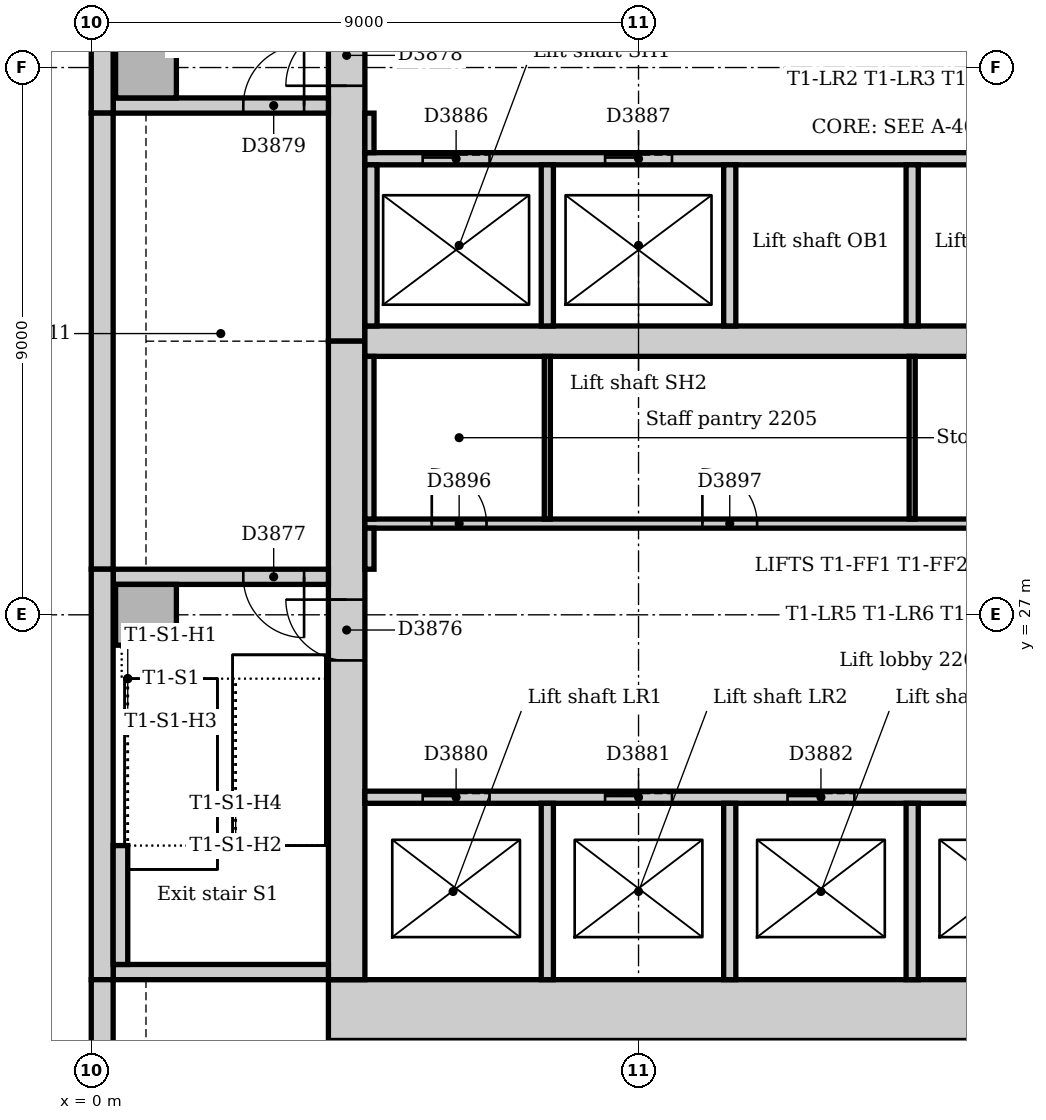
"""IFC4 building model, lengths in metres.
Left out: names, types, materials, properties, quantities, classifications, styles, units other than length and angle.
Written with IfcOpenShell. Run it as: python <this file> out.ifc"""

import sys

from ifc_helpers import new_model, si_unit, direction, frame, frame_2d, origin, origin_2d, place, context, subcontext, project, spatial, rectangle, extrude, element, fill, save


model = new_model("IFC4")
c1 = context("Model", 3, precision=1e-05, world=origin(), true_north=direction((0.0, 1.0)))
c2 = subcontext(c1, "Body", "Model", "MODEL_VIEW")
j1 = project(units=[si_unit("LENGTHUNIT", "METRE"), si_unit("PLANEANGLEUNIT", "RADIAN")], contexts=[c1])
p1 = place(None, origin())
s1 = spatial("IfcSite", under=j1, at=p1, CompositionType="ELEMENT")
p2 = place(p1, origin())
s2 = spatial("IfcBuilding", under=s1, at=p2, CompositionType="ELEMENT")
p3 = place(p2, frame((0.0, 0.0, 95.0)))
s3 = spatial("IfcBuildingStorey", under=s2, at=p3, CompositionType="ELEMENT", Elevation=95.0)
p4 = place(p3, frame((3.9, 20.5, 0.0), z_axis=(0.0, 0.0, 1.0), x_axis=(1.0, 0.0, 0.0)))
e1 = element("IfcWall", 1, at=p4, inside=s3, PredefinedType="SOLIDWALL", context=c2, shape_type="SweptSolid", body=[
    extrude(rectangle(XDim=19.6, YDim=1.0, at=frame_2d((9.8, 0.0))), origin(), (0.0, 0.0, 1.0), 5.0),
])
p5 = place(p3, frame((4.2, 42.0, 0.0), z_axis=(0.0, 0.0, 1.0), x_axis=(0.0, -1.0, 0.0)))
e2 = element("IfcWall", 2, at=p5, inside=s3, PredefinedType="SOLIDWALL", context=c2, shape_type="SweptSolid", body=[
    extrude(rectangle(XDim=10.5, YDim=0.6, at=frame_2d((5.25, 0.0))), origin(), (0.0, 0.0, 1.0), 5.0),
])
p6 = place(p5, frame((5.3, 0.0, 0.0)))
e3 = element("IfcOpeningElement", 3, at=p6, cuts=e2, PredefinedType="OPENING", context=c2, shape_type="SweptSolid", body=[
    extrude(rectangle(XDim=1.0, YDim=2.1, at=frame_2d((0.5, 1.05))), frame((0.0, 0.31, 0.0), z_axis=(0.0, -1.0, 0.0), x_axis=(1.0, 0.0, 0.0)), (0.0, 0.0, 1.0), 0.62),
])
p7 = place(p3, frame((4.2, 31.5, 0.0), z_axis=(0.0, 0.0, 1.0), x_axis=(0.0, -1.0, 0.0)))
e4 = element("IfcWall", 4, at=p7, inside=s3, PredefinedType="SOLIDWALL", context=c2, shape_type="SweptSolid", body=[
    extrude(rectangle(XDim=10.5, YDim=0.6, at=frame_2d((5.25, 0.0))), origin(), (0.0, 0.0, 1.0), 5.0),
])
p8 = place(p7, frame((4.25, 0.0, 0.0)))
e5 = element("IfcOpeningElement", 5, at=p8, cuts=e4, PredefinedType="OPENING", context=c2, shape_type="SweptSolid", body=[
    extrude(rectangle(XDim=1.0, YDim=2.1, at=frame_2d((0.5, 1.05))), frame((0.0, 0.31, 0.0), z_axis=(0.0, -1.0, 0.0), x_axis=(1.0, 0.0, 0.0)), (0.0, 0.0, 1.0), 0.62),
])
p9 = place(p3, frame((4.5, 31.5, 0.0), z_axis=(0.0, 0.0, 1.0), x_axis=(1.0, 0.0, 0.0)))
e6 = element("IfcWall", 6, at=p9, inside=s3, PredefinedType="SOLIDWALL", context=c2, shape_type="SweptSolid", body=[
    extrude(rectangle(XDim=18.0, YDim=0.5, at=frame_2d((9.0, 0.0))), origin(), (0.0, 0.0, 1.0), 5.0),
])
p10 = place(p3, frame((0.36, 21.125, 0.0), z_axis=(0.0, 0.0, 1.0), x_axis=(1.0, 0.0, 0.0)))
e7 = element("IfcWall", 7, at=p10, inside=s3, PredefinedType="SOLIDWALL", context=c2, shape_type="SweptSolid", body=[
    extrude(rectangle(XDim=3.54, YDim=0.25, at=frame_2d((1.77, 0.0))), origin(), (0.0, 0.0, 1.0), 5.0),
])
p11 = place(p3, frame((3.9, 27.625, 0.0), z_axis=(0.0, 0.0, 1.0), x_axis=(-1.0, 0.0, 0.0)))
e8 = element("IfcWall", 8, at=p11, inside=s3, PredefinedType="SOLIDWALL", context=c2, shape_type="SweptSolid", body=[
    extrude(rectangle(XDim=3.54, YDim=0.25, at=frame_2d((1.77, 0.0))), origin(), (0.0, 0.0, 1.0), 5.0),
])
p12 = place(p11, frame((0.4, 0.0, 0.0)))
e9 = element("IfcOpeningElement", 9, at=p12, cuts=e8, PredefinedType="OPENING", context=c2, shape_type="SweptSolid", body=[
    extrude(rectangle(XDim=1.0, YDim=2.1, at=frame_2d((0.5, 1.05))), frame((0.0, 0.135, 0.0), z_axis=(0.0, -1.0, 0.0), x_axis=(1.0, 0.0, 0.0)), (0.0, 0.0, 1.0), 0.27),
])
p13 = place(p3, frame((0.36, 35.375, 0.0), z_axis=(0.0, 0.0, 1.0), x_axis=(1.0, 0.0, 0.0)))
e10 = element("IfcWall", 10, at=p13, inside=s3, PredefinedType="SOLIDWALL", context=c2, shape_type="SweptSolid", body=[
    extrude(rectangle(XDim=3.54, YDim=0.25, at=frame_2d((1.77, 0.0))), origin(), (0.0, 0.0, 1.0), 5.0),
])
p14 = place(p13, frame((2.14, 0.0, 0.0)))
e11 = element("IfcOpeningElement", 11, at=p14, cuts=e10, PredefinedType="OPENING", context=c2, shape_type="SweptSolid", body=[
    extrude(rectangle(XDim=1.0, YDim=2.1, at=frame_2d((0.5, 1.05))), frame((0.0, 0.135, 0.0), z_axis=(0.0, -1.0, 0.0), x_axis=(1.0, 0.0, 0.0)), (0.0, 0.0, 1.0), 0.27),
])
for number, where, z_axis, x_axis in (
    (12, (0.9, 27.0, 0.0), (0.0, 0.0, 1.0), (1.0, 0.0, 0.0)),
    (13, (0.9, 36.0, 0.0), (0.0, 0.0, 1.0), (1.0, 0.0, 0.0)),
):
    element("IfcColumn", number, at=place(p3, frame(where, z_axis=z_axis, x_axis=x_axis)), inside=s3, PredefinedType="COLUMN", context=c2, shape_type="SweptSolid", body=[
        extrude(rectangle(XDim=1.0, YDim=1.0, at=origin_2d()), origin(), (0.0, 0.0, 1.0), 5.0),
    ])
p15 = place(p3, frame((0.18, 40.757, 0.0), z_axis=(0.0, 0.0, 1.0), x_axis=(0.0, -1.0, 0.0)))
e14 = element("IfcWall", 14, at=p15, inside=s3, PredefinedType="STANDARD", context=c2, shape_type="SweptSolid", body=[
    extrude(rectangle(XDim=5.507, YDim=0.36, at=frame_2d((2.754, 0.0))), origin(), (0.0, 0.0, 1.0), 4.85),
])
p16 = place(p3, frame((0.18, 35.25, 0.0), z_axis=(0.0, 0.0, 1.0), x_axis=(0.0, -1.0, 0.0)))
e15 = element("IfcWall", 15, at=p16, inside=s3, PredefinedType="STANDARD", context=c2, shape_type="SweptSolid", body=[
    extrude(rectangle(XDim=7.5, YDim=0.36, at=frame_2d((3.75, 0.0))), origin(), (0.0, 0.0, 1.0), 4.85),
])
p17 = place(p3, frame((0.18, 27.75, 0.0), z_axis=(0.0, 0.0, 1.0), x_axis=(0.0, -1.0, 0.0)))
e16 = element("IfcWall", 16, at=p17, inside=s3, PredefinedType="STANDARD", context=c2, shape_type="SweptSolid", body=[
    extrude(rectangle(XDim=6.75, YDim=0.36, at=frame_2d((3.375, 0.0))), origin(), (0.0, 0.0, 1.0), 4.85),
])
p18 = place(p3, frame((0.18, 21.0, 0.0), z_axis=(0.0, 0.0, 1.0), x_axis=(0.0, -1.0, 0.0)))
e17 = element("IfcWall", 17, at=p18, inside=s3, PredefinedType="STANDARD", context=c2, shape_type="SweptSolid", body=[
    extrude(rectangle(XDim=16.757, YDim=0.36, at=frame_2d((8.379, 0.0))), origin(), (0.0, 0.0, 1.0), 4.85),
])
p19 = place(p18, frame((1.35, 0.0, 0.9)))
e18 = element("IfcOpeningElement", 18, at=p19, cuts=e17, PredefinedType="OPENING", context=c2, shape_type="SweptSolid", body=[
    extrude(rectangle(XDim=3.3, YDim=2.2, at=frame_2d((1.65, 1.1))), frame((0.0, 0.19, 0.0), z_axis=(0.0, -1.0, 0.0), x_axis=(1.0, 0.0, 0.0)), (0.0, 0.0, 1.0), 0.38),
])
p20 = place(p18, frame((5.85, 0.0, 0.9)))
e19 = element("IfcOpeningElement", 19, at=p20, cuts=e17, PredefinedType="OPENING", context=c2, shape_type="SweptSolid", body=[
    extrude(rectangle(XDim=3.3, YDim=2.2, at=frame_2d((1.65, 1.1))), frame((0.0, 0.19, 0.0), z_axis=(0.0, -1.0, 0.0), x_axis=(1.0, 0.0, 0.0)), (0.0, 0.0, 1.0), 0.38),
])
p21 = place(p18, frame((10.35, 0.0, 0.9)))
e20 = element("IfcOpeningElement", 20, at=p21, cuts=e17, PredefinedType="OPENING", context=c2, shape_type="SweptSolid", body=[
    extrude(rectangle(XDim=3.3, YDim=2.2, at=frame_2d((1.65, 1.1))), frame((0.0, 0.19, 0.0), z_axis=(0.0, -1.0, 0.0), x_axis=(1.0, 0.0, 0.0)), (0.0, 0.0, 1.0), 0.38),
])
p22 = place(p3, frame((0.48, 21.25, 0.0), z_axis=(0.0, 0.0, 1.0), x_axis=(0.0, 1.0, 0.0)))
e21 = element("IfcWall", 21, at=p22, inside=s3, PredefinedType="STANDARD", context=c2, shape_type="SweptSolid", body=[
    extrude(rectangle(XDim=1.955, YDim=0.24, at=frame_2d((0.978, 0.0))), origin(), (0.0, 0.0, 1.0), 5.0),
])
p23 = place(p3, frame((4.5, 24.0, 0.0), z_axis=(0.0, 0.0, 1.0), x_axis=(1.0, 0.0, 0.0)))
e22 = element("IfcWall", 22, at=p23, inside=s3, PredefinedType="PARTITIONING", context=c2, shape_type="SweptSolid", body=[
    extrude(rectangle(XDim=18.0, YDim=0.2, at=frame_2d((9.0, 0.0))), origin(), (0.0, 0.0, 1.0), 4.85),
])
p24 = place(p23, frame((0.95, 0.0, 0.0)))
e23 = element("IfcOpeningElement", 23, at=p24, cuts=e22, PredefinedType="OPENING", context=c2, shape_type="SweptSolid", body=[
    extrude(rectangle(XDim=1.1, YDim=2.1, at=frame_2d((0.55, 1.05))), frame((0.0, 0.11, 0.0), z_axis=(0.0, -1.0, 0.0), x_axis=(1.0, 0.0, 0.0)), (0.0, 0.0, 1.0), 0.22),
])
p25 = place(p23, frame((3.95, 0.0, 0.0)))
e24 = element("IfcOpeningElement", 24, at=p25, cuts=e22, PredefinedType="OPENING", context=c2, shape_type="SweptSolid", body=[
    extrude(rectangle(XDim=1.1, YDim=2.1, at=frame_2d((0.55, 1.05))), frame((0.0, 0.11, 0.0), z_axis=(0.0, -1.0, 0.0), x_axis=(1.0, 0.0, 0.0)), (0.0, 0.0, 1.0), 0.22),
])
p26 = place(p23, frame((6.95, 0.0, 0.0)))
e25 = element("IfcOpeningElement", 25, at=p26, cuts=e22, PredefinedType="OPENING", context=c2, shape_type="SweptSolid", body=[
    extrude(rectangle(XDim=1.1, YDim=2.1, at=frame_2d((0.55, 1.05))), frame((0.0, 0.11, 0.0), z_axis=(0.0, -1.0, 0.0), x_axis=(1.0, 0.0, 0.0)), (0.0, 0.0, 1.0), 0.22),
])
p27 = place(p23, frame((9.95, 0.0, 0.0)))
e26 = element("IfcOpeningElement", 26, at=p27, cuts=e22, PredefinedType="OPENING", context=c2, shape_type="SweptSolid", body=[
    extrude(rectangle(XDim=1.1, YDim=2.1, at=frame_2d((0.55, 1.05))), frame((0.0, 0.11, 0.0), z_axis=(0.0, -1.0, 0.0), x_axis=(1.0, 0.0, 0.0)), (0.0, 0.0, 1.0), 0.22),
])
p28 = place(p23, frame((12.95, 0.0, 0.0)))
e27 = element("IfcOpeningElement", 27, at=p28, cuts=e22, PredefinedType="OPENING", context=c2, shape_type="SweptSolid", body=[
    extrude(rectangle(XDim=1.1, YDim=2.1, at=frame_2d((0.55, 1.05))), frame((0.0, 0.11, 0.0), z_axis=(0.0, -1.0, 0.0), x_axis=(1.0, 0.0, 0.0)), (0.0, 0.0, 1.0), 0.22),
])
p29 = place(p23, frame((15.95, 0.0, 0.0)))
e28 = element("IfcOpeningElement", 28, at=p29, cuts=e22, PredefinedType="OPENING", context=c2, shape_type="SweptSolid", body=[
    extrude(rectangle(XDim=1.1, YDim=2.1, at=frame_2d((0.55, 1.05))), frame((0.0, 0.11, 0.0), z_axis=(0.0, -1.0, 0.0), x_axis=(1.0, 0.0, 0.0)), (0.0, 0.0, 1.0), 0.22),
])
p30 = place(p3, frame((4.5, 34.5, 0.0), z_axis=(0.0, 0.0, 1.0), x_axis=(1.0, 0.0, 0.0)))
e29 = element("IfcWall", 29, at=p30, inside=s3, PredefinedType="PARTITIONING", context=c2, shape_type="SweptSolid", body=[
    extrude(rectangle(XDim=18.0, YDim=0.2, at=frame_2d((9.0, 0.0))), origin(), (0.0, 0.0, 1.0), 4.85),
])
p31 = place(p30, frame((0.95, 0.0, 0.0)))
e30 = element("IfcOpeningElement", 30, at=p31, cuts=e29, PredefinedType="OPENING", context=c2, shape_type="SweptSolid", body=[
    extrude(rectangle(XDim=1.1, YDim=2.1, at=frame_2d((0.55, 1.05))), frame((0.0, 0.11, 0.0), z_axis=(0.0, -1.0, 0.0), x_axis=(1.0, 0.0, 0.0)), (0.0, 0.0, 1.0), 0.22),
])
p32 = place(p30, frame((3.95, 0.0, 0.0)))
e31 = element("IfcOpeningElement", 31, at=p32, cuts=e29, PredefinedType="OPENING", context=c2, shape_type="SweptSolid", body=[
    extrude(rectangle(XDim=1.1, YDim=2.1, at=frame_2d((0.55, 1.05))), frame((0.0, 0.11, 0.0), z_axis=(0.0, -1.0, 0.0), x_axis=(1.0, 0.0, 0.0)), (0.0, 0.0, 1.0), 0.22),
])
p33 = place(p30, frame((12.95, 0.0, 0.0)))
e32 = element("IfcOpeningElement", 32, at=p33, cuts=e29, PredefinedType="OPENING", context=c2, shape_type="SweptSolid", body=[
    extrude(rectangle(XDim=1.1, YDim=2.1, at=frame_2d((0.55, 1.05))), frame((0.0, 0.11, 0.0), z_axis=(0.0, -1.0, 0.0), x_axis=(1.0, 0.0, 0.0)), (0.0, 0.0, 1.0), 0.22),
])
p34 = place(p30, frame((15.95, 0.0, 0.0)))
e33 = element("IfcOpeningElement", 33, at=p34, cuts=e29, PredefinedType="OPENING", context=c2, shape_type="SweptSolid", body=[
    extrude(rectangle(XDim=1.1, YDim=2.1, at=frame_2d((0.55, 1.05))), frame((0.0, 0.11, 0.0), z_axis=(0.0, -1.0, 0.0), x_axis=(1.0, 0.0, 0.0)), (0.0, 0.0, 1.0), 0.22),
])
p35 = place(p3, frame((4.6, 31.75, 0.0), z_axis=(0.0, 0.0, 1.0), x_axis=(0.0, 1.0, 0.0)))
e34 = element("IfcWall", 34, at=p35, inside=s3, PredefinedType="PARTITIONING", context=c2, shape_type="SweptSolid", body=[
    extrude(rectangle(XDim=2.65, YDim=0.2, at=frame_2d((1.325, 0.0))), origin(), (0.0, 0.0, 1.0), 4.85),
])
p36 = place(p3, frame((7.5, 21.0, 0.0), z_axis=(0.0, 0.0, 1.0), x_axis=(0.0, 1.0, 0.0)))
e35 = element("IfcWall", 35, at=p36, inside=s3, PredefinedType="PARTITIONING", context=c2, shape_type="SweptSolid", body=[
    extrude(rectangle(XDim=2.9, YDim=0.2, at=frame_2d((1.45, 0.0))), origin(), (0.0, 0.0, 1.0), 4.85),
])
p37 = place(p3, frame((7.5, 31.75, 0.0), z_axis=(0.0, 0.0, 1.0), x_axis=(0.0, 1.0, 0.0)))
e36 = element("IfcWall", 36, at=p37, inside=s3, PredefinedType="PARTITIONING", context=c2, shape_type="SweptSolid", body=[
    extrude(rectangle(XDim=2.65, YDim=0.2, at=frame_2d((1.325, 0.0))), origin(), (0.0, 0.0, 1.0), 4.85),
])
p38 = place(p3, frame((10.5, 21.0, 0.0), z_axis=(0.0, 0.0, 1.0), x_axis=(0.0, 1.0, 0.0)))
e37 = element("IfcWall", 37, at=p38, inside=s3, PredefinedType="PARTITIONING", context=c2, shape_type="SweptSolid", body=[
    extrude(rectangle(XDim=2.9, YDim=0.2, at=frame_2d((1.45, 0.0))), origin(), (0.0, 0.0, 1.0), 4.85),
])
p39 = place(p3, frame((10.5, 31.75, 0.0), z_axis=(0.0, 0.0, 1.0), x_axis=(0.0, 1.0, 0.0)))
e38 = element("IfcWall", 38, at=p39, inside=s3, PredefinedType="PARTITIONING", context=c2, shape_type="SweptSolid", body=[
    extrude(rectangle(XDim=2.65, YDim=0.2, at=frame_2d((1.325, 0.0))), origin(), (0.0, 0.0, 1.0), 4.85),
])
p40 = place(p3, frame((13.5, 21.0, 0.0), z_axis=(0.0, 0.0, 1.0), x_axis=(0.0, 1.0, 0.0)))
e39 = element("IfcWall", 39, at=p40, inside=s3, PredefinedType="PARTITIONING", context=c2, shape_type="SweptSolid", body=[
    extrude(rectangle(XDim=2.9, YDim=0.2, at=frame_2d((1.45, 0.0))), origin(), (0.0, 0.0, 1.0), 4.85),
])
p41 = place(p3, frame((13.5, 31.75, 0.0), z_axis=(0.0, 0.0, 1.0), x_axis=(0.0, 1.0, 0.0)))
e40 = element("IfcWall", 40, at=p41, inside=s3, PredefinedType="PARTITIONING", context=c2, shape_type="SweptSolid", body=[
    extrude(rectangle(XDim=2.65, YDim=0.2, at=frame_2d((1.325, 0.0))), origin(), (0.0, 0.0, 1.0), 4.85),
])
p42 = place(p3, frame((4.5, 28.5, 0.0), z_axis=(0.0, 0.0, 1.0), x_axis=(1.0, 0.0, 0.0)))
e41 = element("IfcWall", 41, at=p42, inside=s3, PredefinedType="PARTITIONING", context=c2, shape_type="SweptSolid", body=[
    extrude(rectangle(XDim=18.0, YDim=0.15, at=frame_2d((9.0, 0.0))), origin(), (0.0, 0.0, 1.0), 4.85),
])
p43 = place(p42, frame((1.1, 0.0, 0.0)))
e42 = element("IfcOpeningElement", 42, at=p43, cuts=e41, PredefinedType="OPENING", context=c2, shape_type="SweptSolid", body=[
    extrude(rectangle(XDim=0.9, YDim=2.1, at=frame_2d((0.45, 1.05))), frame((0.0, 0.085, 0.0), z_axis=(0.0, -1.0, 0.0), x_axis=(1.0, 0.0, 0.0)), (0.0, 0.0, 1.0), 0.17),
])
p44 = place(p42, frame((5.55, 0.0, 0.0)))
e43 = element("IfcOpeningElement", 43, at=p44, cuts=e41, PredefinedType="OPENING", context=c2, shape_type="SweptSolid", body=[
    extrude(rectangle(XDim=0.9, YDim=2.1, at=frame_2d((0.45, 1.05))), frame((0.0, 0.085, 0.0), z_axis=(0.0, -1.0, 0.0), x_axis=(1.0, 0.0, 0.0)), (0.0, 0.0, 1.0), 0.17),
])
p45 = place(p42, frame((12.95, 0.0, 0.0)))
e44 = element("IfcOpeningElement", 44, at=p45, cuts=e41, PredefinedType="OPENING", context=c2, shape_type="SweptSolid", body=[
    extrude(rectangle(XDim=0.9, YDim=2.1, at=frame_2d((0.45, 1.05))), frame((0.0, 0.085, 0.0), z_axis=(0.0, -1.0, 0.0), x_axis=(1.0, 0.0, 0.0)), (0.0, 0.0, 1.0), 0.17),
])
p46 = place(p3, frame((4.575, 27.75, 0.0), z_axis=(0.0, 0.0, 1.0), x_axis=(0.0, 1.0, 0.0)))
e45 = element("IfcWall", 45, at=p46, inside=s3, PredefinedType="PARTITIONING", context=c2, shape_type="SweptSolid", body=[
    extrude(rectangle(XDim=0.675, YDim=0.15, at=frame_2d((0.338, 0.0))), origin(), (0.0, 0.0, 1.0), 4.85),
])
p47 = place(p3, frame((4.575, 28.575, 0.0), z_axis=(0.0, 0.0, 1.0), x_axis=(0.0, 1.0, 0.0)))
e46 = element("IfcWall", 46, at=p47, inside=s3, PredefinedType="PARTITIONING", context=c2, shape_type="SweptSolid", body=[
    extrude(rectangle(XDim=2.675, YDim=0.15, at=frame_2d((1.337, 0.0))), origin(), (0.0, 0.0, 1.0), 4.85),
])
p48 = place(p3, frame((4.575, 34.6, 0.0), z_axis=(0.0, 0.0, 1.0), x_axis=(0.0, 1.0, 0.0)))
e47 = element("IfcWall", 47, at=p48, inside=s3, PredefinedType="PARTITIONING", context=c2, shape_type="SweptSolid", body=[
    extrude(rectangle(XDim=0.65, YDim=0.15, at=frame_2d((0.325, 0.0))), origin(), (0.0, 0.0, 1.0), 4.85),
])
for number, where, z_axis, x_axis in (
    (48, (7.5, 28.575, 0.0), (0.0, 0.0, 1.0), (0.0, 1.0, 0.0)),
    (49, (13.5, 28.575, 0.0), (0.0, 0.0, 1.0), (0.0, 1.0, 0.0)),
):
    element("IfcWall", number, at=place(p3, frame(where, z_axis=z_axis, x_axis=x_axis)), inside=s3, PredefinedType="PARTITIONING", context=c2, shape_type="SweptSolid", body=[
        extrude(rectangle(XDim=2.675, YDim=0.1, at=frame_2d((1.337, 0.0))), origin(), (0.0, 0.0, 1.0), 4.85),
    ])
p49 = place(p8, frame((1.0, 0.0, 0.0), z_axis=(0.0, 0.0, 1.0), x_axis=(-1.0, 0.0, 0.0)))
e50 = element("IfcDoor", 50, at=p49, inside=s3, OperationType="SINGLE_SWING_RIGHT", PredefinedType="DOOR", context=c2, shape_type="SweptSolid", body=[
    extrude(rectangle(XDim=1.0, YDim=2.1, at=frame_2d((0.5, 1.05))), frame((0.0, 0.025, 0.0), z_axis=(0.0, -1.0, 0.0), x_axis=(1.0, 0.0, 0.0)), (0.0, 0.0, 1.0), 0.05),
])
fill(e5, e50)
p50 = place(p12, origin())
e51 = element("IfcDoor", 51, at=p50, inside=s3, OperationType="SINGLE_SWING_LEFT", PredefinedType="DOOR", context=c2, shape_type="SweptSolid", body=[
    extrude(rectangle(XDim=1.0, YDim=2.1, at=frame_2d((0.5, 1.05))), frame((0.0, 0.025, 0.0), z_axis=(0.0, -1.0, 0.0), x_axis=(1.0, 0.0, 0.0)), (0.0, 0.0, 1.0), 0.05),
])
fill(e9, e51)
p51 = place(p6, frame((1.0, 0.0, 0.0), z_axis=(0.0, 0.0, 1.0), x_axis=(-1.0, 0.0, 0.0)))
e52 = element("IfcDoor", 52, at=p51, inside=s3, OperationType="SINGLE_SWING_LEFT", PredefinedType="DOOR", context=c2, shape_type="SweptSolid", body=[
    extrude(rectangle(XDim=1.0, YDim=2.1, at=frame_2d((0.5, 1.05))), frame((0.0, 0.025, 0.0), z_axis=(0.0, -1.0, 0.0), x_axis=(1.0, 0.0, 0.0)), (0.0, 0.0, 1.0), 0.05),
])
fill(e3, e52)
p52 = place(p14, origin())
e53 = element("IfcDoor", 53, at=p52, inside=s3, OperationType="SINGLE_SWING_RIGHT", PredefinedType="DOOR", context=c2, shape_type="SweptSolid", body=[
    extrude(rectangle(XDim=1.0, YDim=2.1, at=frame_2d((0.5, 1.05))), frame((0.0, 0.025, 0.0), z_axis=(0.0, -1.0, 0.0), x_axis=(1.0, 0.0, 0.0)), (0.0, 0.0, 1.0), 0.05),
])
fill(e11, e53)
p53 = place(p24, origin())
e54 = element("IfcDoor", 54, at=p53, inside=s3, OperationType="SLIDING_TO_LEFT", PredefinedType="DOOR", context=c2, shape_type="SweptSolid", body=[
    extrude(rectangle(XDim=1.1, YDim=2.1, at=frame_2d((0.55, 1.05))), frame((0.0, 0.025, 0.0), z_axis=(0.0, -1.0, 0.0), x_axis=(1.0, 0.0, 0.0)), (0.0, 0.0, 1.0), 0.05),
])
fill(e23, e54)
p54 = place(p25, origin())
e55 = element("IfcDoor", 55, at=p54, inside=s3, OperationType="SLIDING_TO_LEFT", PredefinedType="DOOR", context=c2, shape_type="SweptSolid", body=[
    extrude(rectangle(XDim=1.1, YDim=2.1, at=frame_2d((0.55, 1.05))), frame((0.0, 0.025, 0.0), z_axis=(0.0, -1.0, 0.0), x_axis=(1.0, 0.0, 0.0)), (0.0, 0.0, 1.0), 0.05),
])
fill(e24, e55)
p55 = place(p26, origin())
e56 = element("IfcDoor", 56, at=p55, inside=s3, OperationType="SLIDING_TO_LEFT", PredefinedType="DOOR", context=c2, shape_type="SweptSolid", body=[
    extrude(rectangle(XDim=1.1, YDim=2.1, at=frame_2d((0.55, 1.05))), frame((0.0, 0.025, 0.0), z_axis=(0.0, -1.0, 0.0), x_axis=(1.0, 0.0, 0.0)), (0.0, 0.0, 1.0), 0.05),
])
fill(e25, e56)
p56 = place(p31, origin())
e57 = element("IfcDoor", 57, at=p56, inside=s3, OperationType="SLIDING_TO_LEFT", PredefinedType="DOOR", context=c2, shape_type="SweptSolid", body=[
    extrude(rectangle(XDim=1.1, YDim=2.1, at=frame_2d((0.55, 1.05))), frame((0.0, 0.025, 0.0), z_axis=(0.0, -1.0, 0.0), x_axis=(1.0, 0.0, 0.0)), (0.0, 0.0, 1.0), 0.05),
])
fill(e30, e57)
p57 = place(p32, origin())
e58 = element("IfcDoor", 58, at=p57, inside=s3, OperationType="SLIDING_TO_LEFT", PredefinedType="DOOR", context=c2, shape_type="SweptSolid", body=[
    extrude(rectangle(XDim=1.1, YDim=2.1, at=frame_2d((0.55, 1.05))), frame((0.0, 0.025, 0.0), z_axis=(0.0, -1.0, 0.0), x_axis=(1.0, 0.0, 0.0)), (0.0, 0.0, 1.0), 0.05),
])
fill(e31, e58)
p58 = place(p43, origin())
e59 = element("IfcDoor", 59, at=p58, inside=s3, OperationType="SINGLE_SWING_LEFT", PredefinedType="DOOR", context=c2, shape_type="SweptSolid", body=[
    extrude(rectangle(XDim=0.9, YDim=2.1, at=frame_2d((0.45, 1.05))), frame((0.0, 0.025, 0.0), z_axis=(0.0, -1.0, 0.0), x_axis=(1.0, 0.0, 0.0)), (0.0, 0.0, 1.0), 0.05),
])
fill(e42, e59)
p59 = place(p44, origin())
e60 = element("IfcDoor", 60, at=p59, inside=s3, OperationType="SINGLE_SWING_LEFT", PredefinedType="DOOR", context=c2, shape_type="SweptSolid", body=[
    extrude(rectangle(XDim=0.9, YDim=2.1, at=frame_2d((0.45, 1.05))), frame((0.0, 0.025, 0.0), z_axis=(0.0, -1.0, 0.0), x_axis=(1.0, 0.0, 0.0)), (0.0, 0.0, 1.0), 0.05),
])
fill(e43, e60)
save(model, sys.argv[1])
